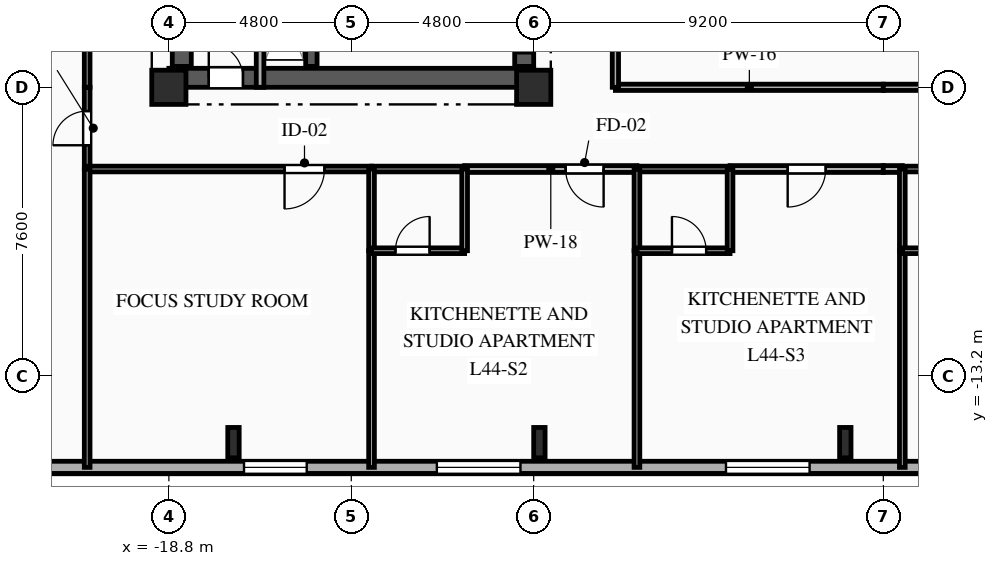
"""IFC4 building model, lengths in metres.
Left out: names, types, materials, properties, quantities, classifications, styles, units other than length and angle.
Written with IfcOpenShell. Run it as: python <this file> out.ifc"""

import sys

from ifc_helpers import new_model, si_unit, direction, frame, frame_2d, origin, origin_2d, place, context, subcontext, project, spatial, rectangle, i_section, extrude, element, fill, save


model = new_model("IFC4")
c1 = context("Model", 3, precision=1e-05, world=origin(), true_north=direction((0.0, 1.0)))
c2 = subcontext(c1, "Body", "Model", "MODEL_VIEW")
j1 = project(units=[si_unit("LENGTHUNIT", "METRE"), si_unit("PLANEANGLEUNIT", "RADIAN")], contexts=[c1])
p1 = place(None, origin())
s1 = spatial("IfcSite", under=j1, at=p1, CompositionType="ELEMENT")
p2 = place(p1, origin())
s2 = spatial("IfcBuilding", under=s1, at=p2, CompositionType="ELEMENT")
p3 = place(p2, frame((0.0, 0.0, 157.8)))
s3 = spatial("IfcBuildingStorey", under=s2, at=p3, CompositionType="ELEMENT", Elevation=157.8)
for number, where, z_axis, x_axis in (
    (1, (-18.8, -5.6, 0.0), (0.0, 0.0, 1.0), (1.0, 0.0, 0.0)),
    (2, (-9.2, -5.6, 0.0), (0.0, 0.0, 1.0), (1.0, 0.0, 0.0)),
):
    element("IfcColumn", number, at=place(p3, frame(where, z_axis=z_axis, x_axis=x_axis)), inside=s3, PredefinedType="COLUMN", context=c2, shape_type="SweptSolid", body=[
        extrude(rectangle(XDim=0.9, YDim=0.9, at=origin_2d()), origin(), (0.0, 0.0, 1.0), 3.35),
    ])
for number, where, z_axis, x_axis in (
    (3, (-17.1, -14.95, 0.0), (0.0, 0.0, 1.0), (1.0, 0.0, 0.0)),
    (4, (-9.05, -14.95, 0.0), (0.0, 0.0, 1.0), (1.0, 0.0, 0.0)),
    (5, (-1.0, -14.95, 0.0), (0.0, 0.0, 1.0), (1.0, 0.0, 0.0)),
):
    element("IfcColumn", number, at=place(p3, frame(where, z_axis=z_axis, x_axis=x_axis)), inside=s3, PredefinedType="COLUMN", context=c2, shape_type="SweptSolid", body=[
        extrude(i_section(OverallWidth=0.3, OverallDepth=0.8, WebThickness=0.018, FlangeThickness=0.033, FilletRadius=0.03, at=origin_2d()), origin(), (0.0, 0.0, 1.0), 3.35),
    ])
p4 = place(p3, frame((23.8, -15.6, 0.0), z_axis=(0.0, 0.0, 1.0), x_axis=(-1.0, 0.0, 0.0)))
e6 = element("IfcWall", 6, at=p4, inside=s3, PredefinedType="SOLIDWALL", context=c2, shape_type="SweptSolid", body=[
    extrude(rectangle(XDim=49.6, YDim=0.32, at=frame_2d((24.8, 0.0))), origin(), (0.0, 0.0, 1.0), 3.04),
])
p5 = place(p4, frame((1.13, 0.0, 0.85)))
e7 = element("IfcOpeningElement", 7, at=p5, cuts=e6, PredefinedType="OPENING", context=c2, shape_type="SweptSolid", body=[
    extrude(rectangle(XDim=1.1, YDim=1.85, at=frame_2d((0.55, 0.925))), frame((0.0, 0.17, 0.0), z_axis=(0.0, -1.0, 0.0), x_axis=(1.0, 0.0, 0.0)), (0.0, 0.0, 1.0), 0.34),
])
p6 = place(p4, frame((5.295, 0.0, 0.85)))
e8 = element("IfcOpeningElement", 8, at=p6, cuts=e6, PredefinedType="OPENING", context=c2, shape_type="SweptSolid", body=[
    extrude(rectangle(XDim=1.65, YDim=1.85, at=frame_2d((0.825, 0.925))), frame((0.0, 0.17, 0.0), z_axis=(0.0, -1.0, 0.0), x_axis=(1.0, 0.0, 0.0)), (0.0, 0.0, 1.0), 0.34),
])
p7 = place(p4, frame((11.74, 0.0, 0.85)))
e9 = element("IfcOpeningElement", 9, at=p7, cuts=e6, PredefinedType="OPENING", context=c2, shape_type="SweptSolid", body=[
    extrude(rectangle(XDim=2.2, YDim=1.85, at=frame_2d((1.1, 0.925))), frame((0.0, 0.17, 0.0), z_axis=(0.0, -1.0, 0.0), x_axis=(1.0, 0.0, 0.0)), (0.0, 0.0, 1.0), 0.34),
])
p8 = place(p4, frame((18.74, 0.0, 0.85)))
e10 = element("IfcOpeningElement", 10, at=p8, cuts=e6, PredefinedType="OPENING", context=c2, shape_type="SweptSolid", body=[
    extrude(rectangle(XDim=2.2, YDim=1.85, at=frame_2d((1.1, 0.925))), frame((0.0, 0.17, 0.0), z_axis=(0.0, -1.0, 0.0), x_axis=(1.0, 0.0, 0.0)), (0.0, 0.0, 1.0), 0.34),
])
p9 = place(p4, frame((25.74, 0.0, 0.85)))
e11 = element("IfcOpeningElement", 11, at=p9, cuts=e6, PredefinedType="OPENING", context=c2, shape_type="SweptSolid", body=[
    extrude(rectangle(XDim=2.2, YDim=1.85, at=frame_2d((1.1, 0.925))), frame((0.0, 0.17, 0.0), z_axis=(0.0, -1.0, 0.0), x_axis=(1.0, 0.0, 0.0)), (0.0, 0.0, 1.0), 0.34),
])
p10 = place(p4, frame((33.348, 0.0, 0.85)))
e12 = element("IfcOpeningElement", 12, at=p10, cuts=e6, PredefinedType="OPENING", context=c2, shape_type="SweptSolid", body=[
    extrude(rectangle(XDim=2.2, YDim=1.85, at=frame_2d((1.1, 0.925))), frame((0.0, 0.17, 0.0), z_axis=(0.0, -1.0, 0.0), x_axis=(1.0, 0.0, 0.0)), (0.0, 0.0, 1.0), 0.34),
])
p11 = place(p4, frame((38.972, 0.0, 0.85)))
e13 = element("IfcOpeningElement", 13, at=p11, cuts=e6, PredefinedType="OPENING", context=c2, shape_type="SweptSolid", body=[
    extrude(rectangle(XDim=1.65, YDim=1.85, at=frame_2d((0.825, 0.925))), frame((0.0, 0.17, 0.0), z_axis=(0.0, -1.0, 0.0), x_axis=(1.0, 0.0, 0.0)), (0.0, 0.0, 1.0), 0.34),
])
p12 = place(p4, frame((45.895, 0.0, 0.85)))
e14 = element("IfcOpeningElement", 14, at=p12, cuts=e6, PredefinedType="OPENING", context=c2, shape_type="SweptSolid", body=[
    extrude(rectangle(XDim=1.65, YDim=1.85, at=frame_2d((0.825, 0.925))), frame((0.0, 0.17, 0.0), z_axis=(0.0, -1.0, 0.0), x_axis=(1.0, 0.0, 0.0)), (0.0, 0.0, 1.0), 0.34),
])
p13 = place(p3, frame((-18.8, -5.35, 0.0), z_axis=(0.0, 0.0, 1.0), x_axis=(1.0, 0.0, 0.0)))
e15 = element("IfcWall", 15, at=p13, inside=s3, PredefinedType="SHEAR", context=c2, shape_type="SweptSolid", body=[
    extrude(rectangle(XDim=9.6, YDim=0.5, at=frame_2d((4.8, 0.0))), origin(), (0.0, 0.0, 1.0), 3.04),
])
p14 = place(p13, frame((1.05, 0.0, 0.0)))
e16 = element("IfcOpeningElement", 16, at=p14, cuts=e15, PredefinedType="OPENING", context=c2, shape_type="SweptSolid", body=[
    extrude(rectangle(XDim=0.9, YDim=2.1, at=frame_2d((0.45, 1.05))), frame((0.0, 0.26, 0.0), z_axis=(0.0, -1.0, 0.0), x_axis=(1.0, 0.0, 0.0)), (0.0, 0.0, 1.0), 0.52),
])
p15 = place(p3, frame((-18.46, -5.05, 0.0), z_axis=(0.0, 0.0, 1.0), x_axis=(0.0, 1.0, 0.0)))
e17 = element("IfcWall", 17, at=p15, inside=s3, PredefinedType="SHEAR", context=c2, shape_type="SweptSolid", body=[
    extrude(rectangle(XDim=10.1, YDim=0.5, at=frame_2d((5.05, 0.0))), origin(), (0.0, 0.0, 1.0), 3.04),
])
p16 = place(p3, frame((-9.45, -5.05, 0.0), z_axis=(0.0, 0.0, 1.0), x_axis=(0.0, 1.0, 0.0)))
e18 = element("IfcWall", 18, at=p16, inside=s3, PredefinedType="SHEAR", context=c2, shape_type="SweptSolid", body=[
    extrude(rectangle(XDim=10.1, YDim=0.5, at=frame_2d((5.05, 0.0))), origin(), (0.0, 0.0, 1.0), 3.04),
])
p17 = place(p16, frame((7.15, 0.0, 0.0)))
e19 = element("IfcOpeningElement", 19, at=p17, cuts=e18, PredefinedType="OPENING", context=c2, shape_type="SweptSolid", body=[
    extrude(rectangle(XDim=0.9, YDim=2.1, at=frame_2d((0.45, 1.05))), frame((0.0, 0.26, 0.0), z_axis=(0.0, -1.0, 0.0), x_axis=(1.0, 0.0, 0.0)), (0.0, 0.0, 1.0), 0.52),
])
p18 = place(p16, frame((2.4, 0.0, 0.0)))
e20 = element("IfcOpeningElement", 20, at=p18, cuts=e18, PredefinedType="OPENING", context=c2, shape_type="SweptSolid", body=[
    extrude(rectangle(XDim=1.2, YDim=2.15, at=frame_2d((0.6, 1.075))), frame((0.0, 0.26, 0.0), z_axis=(0.0, -1.0, 0.0), x_axis=(1.0, 0.0, 0.0)), (0.0, 0.0, 1.0), 0.52),
])
p19 = place(p16, frame((0.35, 0.0, 0.0)))
e21 = element("IfcOpeningElement", 21, at=p19, cuts=e18, PredefinedType="OPENING", context=c2, shape_type="SweptSolid", body=[
    extrude(rectangle(XDim=0.9, YDim=2.1, at=frame_2d((0.45, 1.05))), frame((0.0, 0.26, 0.0), z_axis=(0.0, -1.0, 0.0), x_axis=(1.0, 0.0, 0.0)), (0.0, 0.0, 1.0), 0.52),
])
p20 = place(p16, frame((5.0, 0.0, 0.0)))
e22 = element("IfcOpeningElement", 22, at=p20, cuts=e18, PredefinedType="OPENING", context=c2, shape_type="SweptSolid", body=[
    extrude(rectangle(XDim=0.9, YDim=2.1, at=frame_2d((0.45, 1.05))), frame((0.0, 0.26, 0.0), z_axis=(0.0, -1.0, 0.0), x_axis=(1.0, 0.0, 0.0)), (0.0, 0.0, 1.0), 0.52),
])
p21 = place(p3, frame((-15.05, -5.05, 0.0), z_axis=(0.0, 0.0, 1.0), x_axis=(0.0, 1.0, 0.0)))
e23 = element("IfcWall", 23, at=p21, inside=s3, PredefinedType="SHEAR", context=c2, shape_type="SweptSolid", body=[
    extrude(rectangle(XDim=10.1, YDim=0.3, at=frame_2d((5.05, 0.0))), origin(), (0.0, 0.0, 1.0), 3.04),
])
p22 = place(p3, frame((-16.4, -5.6, 0.0), z_axis=(0.0, 0.0, 1.0), x_axis=(0.0, 1.0, 0.0)))
e24 = element("IfcWall", 24, at=p22, inside=s3, PredefinedType="PARTITIONING", context=c2, shape_type="SweptSolid", body=[
    extrude(rectangle(XDim=3.49, YDim=0.2, at=frame_2d((1.745, 0.0))), origin(), (0.0, 0.0, 1.0), 3.04),
])
p23 = place(p3, frame((-20.95, -7.75, 0.0), z_axis=(0.0, 0.0, 1.0), x_axis=(0.0, 1.0, 0.0)))
e25 = element("IfcWall", 25, at=p23, inside=s3, PredefinedType="PARTITIONING", context=c2, shape_type="SweptSolid", body=[
    extrude(rectangle(XDim=2.15, YDim=0.15, at=frame_2d((1.075, 0.0))), origin(), (0.0, 0.0, 1.0), 3.04),
])
p24 = place(p23, frame((0.625, 0.0, 0.0)))
e26 = element("IfcOpeningElement", 26, at=p24, cuts=e25, PredefinedType="OPENING", context=c2, shape_type="SweptSolid", body=[
    extrude(rectangle(XDim=0.9, YDim=2.1, at=frame_2d((0.45, 1.05))), frame((0.0, 0.085, 0.0), z_axis=(0.0, -1.0, 0.0), x_axis=(1.0, 0.0, 0.0)), (0.0, 0.0, 1.0), 0.17),
])
p25 = place(p3, frame((-13.467, -7.75, 0.0), z_axis=(0.0, 0.0, 1.0), x_axis=(-1.0, 0.0, 0.0)))
e27 = element("IfcWall", 27, at=p25, inside=s3, PredefinedType="PARTITIONING", context=c2, shape_type="SweptSolid", body=[
    extrude(rectangle(XDim=7.483, YDim=0.15, at=frame_2d((3.741, 0.0))), origin(), (0.0, 0.0, 1.0), 3.04),
])
p26 = place(p25, frame((1.239, 0.0, 0.0)))
e28 = element("IfcOpeningElement", 28, at=p26, cuts=e27, PredefinedType="OPENING", context=c2, shape_type="SweptSolid", body=[
    extrude(rectangle(XDim=1.05, YDim=2.15, at=frame_2d((0.525, 1.075))), frame((0.0, 0.085, 0.0), z_axis=(0.0, -1.0, 0.0), x_axis=(1.0, 0.0, 0.0)), (0.0, 0.0, 1.0), 0.17),
])
p27 = place(p3, frame((-6.483, -7.75, 0.0), z_axis=(0.0, 0.0, 1.0), x_axis=(-1.0, 0.0, 0.0)))
e29 = element("IfcWall", 29, at=p27, inside=s3, PredefinedType="PARTITIONING", context=c2, shape_type="SweptSolid", body=[
    extrude(rectangle(XDim=4.534, YDim=0.18, at=frame_2d((2.267, 0.0))), origin(), (0.0, 0.0, 1.0), 3.04),
])
p28 = place(p27, frame((0.877, 0.0, 0.0)))
e30 = element("IfcOpeningElement", 30, at=p28, cuts=e29, PredefinedType="OPENING", context=c2, shape_type="SweptSolid", body=[
    extrude(rectangle(XDim=1.0, YDim=2.15, at=frame_2d((0.5, 1.075))), frame((0.0, 0.1, 0.0), z_axis=(0.0, -1.0, 0.0), x_axis=(1.0, 0.0, 0.0)), (0.0, 0.0, 1.0), 0.2),
])
p29 = place(p3, frame((-11.017, -7.75, 0.0), z_axis=(0.0, 0.0, 1.0), x_axis=(-1.0, 0.0, 0.0)))
e31 = element("IfcWall", 31, at=p29, inside=s3, PredefinedType="PLUMBINGWALL", context=c2, shape_type="SweptSolid", body=[
    extrude(rectangle(XDim=2.45, YDim=0.15, at=frame_2d((1.225, 0.0))), origin(), (0.0, 0.0, 1.0), 3.04),
])
p30 = place(p3, frame((0.0, -7.75, 0.0), z_axis=(0.0, 0.0, 1.0), x_axis=(-1.0, 0.0, 0.0)))
e32 = element("IfcWall", 32, at=p30, inside=s3, PredefinedType="PARTITIONING", context=c2, shape_type="SweptSolid", body=[
    extrude(rectangle(XDim=4.033, YDim=0.18, at=frame_2d((2.017, 0.0))), origin(), (0.0, 0.0, 1.0), 3.04),
])
p31 = place(p30, frame((1.517, 0.0, 0.0)))
e33 = element("IfcOpeningElement", 33, at=p31, cuts=e32, PredefinedType="OPENING", context=c2, shape_type="SweptSolid", body=[
    extrude(rectangle(XDim=1.0, YDim=2.15, at=frame_2d((0.5, 1.075))), frame((0.0, 0.1, 0.0), z_axis=(0.0, -1.0, 0.0), x_axis=(1.0, 0.0, 0.0)), (0.0, 0.0, 1.0), 0.2),
])
p32 = place(p3, frame((-4.033, -7.75, 0.0), z_axis=(0.0, 0.0, 1.0), x_axis=(-1.0, 0.0, 0.0)))
e34 = element("IfcWall", 34, at=p32, inside=s3, PredefinedType="PLUMBINGWALL", context=c2, shape_type="SweptSolid", body=[
    extrude(rectangle(XDim=2.45, YDim=0.15, at=frame_2d((1.225, 0.0))), origin(), (0.0, 0.0, 1.0), 3.04),
])
p33 = place(p3, frame((-7.05, -5.6, 0.0), z_axis=(0.0, 0.0, 1.0), x_axis=(1.0, 0.0, 0.0)))
e35 = element("IfcWall", 35, at=p33, inside=s3, PredefinedType="PARTITIONING", context=c2, shape_type="SweptSolid", body=[
    extrude(rectangle(XDim=7.05, YDim=0.165, at=frame_2d((3.525, 0.0))), origin(), (0.0, 0.0, 1.0), 2.525),
])
p34 = place(p3, frame((0.5, -7.75, 0.0), z_axis=(0.0, 0.0, 1.0), x_axis=(-1.0, 0.0, 0.0)))
e36 = element("IfcWall", 36, at=p34, inside=s3, PredefinedType="PARTITIONING", context=c2, shape_type="SweptSolid", body=[
    extrude(rectangle(XDim=0.5, YDim=0.18, at=frame_2d((0.25, 0.0))), origin(), (0.0, 0.0, 1.0), 3.04),
])
p35 = place(p3, frame((2.95, -7.75, 0.0), z_axis=(0.0, 0.0, 1.0), x_axis=(-1.0, 0.0, 0.0)))
e37 = element("IfcWall", 37, at=p35, inside=s3, PredefinedType="PLUMBINGWALL", context=c2, shape_type="SweptSolid", body=[
    extrude(rectangle(XDim=2.45, YDim=0.15, at=frame_2d((1.225, 0.0))), origin(), (0.0, 0.0, 1.0), 3.04),
])
p36 = place(p3, frame((0.0, -5.6, 0.0), z_axis=(0.0, 0.0, 1.0), x_axis=(1.0, 0.0, 0.0)))
e38 = element("IfcWall", 38, at=p36, inside=s3, PredefinedType="PARTITIONING", context=c2, shape_type="SweptSolid", body=[
    extrude(rectangle(XDim=7.05, YDim=0.165, at=frame_2d((3.525, 0.0))), origin(), (0.0, 0.0, 1.0), 2.525),
])
p37 = place(p3, frame((-20.95, -5.6, 0.0), z_axis=(0.0, 0.0, 1.0), x_axis=(0.0, 1.0, 0.0)))
e39 = element("IfcWall", 39, at=p37, inside=s3, PredefinedType="PARTITIONING", context=c2, shape_type="SweptSolid", body=[
    extrude(rectangle(XDim=2.14, YDim=0.15, at=frame_2d((1.07, 0.0))), origin(), (0.0, 0.0, 1.0), 3.04),
])
p38 = place(p3, frame((-7.05, -2.95, 0.0), z_axis=(0.0, 0.0, 1.0), x_axis=(0.0, -1.0, 0.0)))
e40 = element("IfcWall", 40, at=p38, inside=s3, PredefinedType="PARTITIONING", context=c2, shape_type="SweptSolid", body=[
    extrude(rectangle(XDim=2.65, YDim=0.165, at=frame_2d((1.325, 0.0))), origin(), (0.0, 0.0, 1.0), 3.04),
])
p39 = place(p3, frame((-20.95, -7.75, 0.0), z_axis=(0.0, 0.0, 1.0), x_axis=(0.0, -1.0, 0.0)))
e41 = element("IfcWall", 41, at=p39, inside=s3, PredefinedType="PARTITIONING", context=c2, shape_type="SweptSolid", body=[
    extrude(rectangle(XDim=7.85, YDim=0.15, at=frame_2d((3.925, 0.0))), origin(), (0.0, 0.0, 1.0), 3.04),
])
p40 = place(p3, frame((-13.467, -9.9, 0.0), z_axis=(0.0, 0.0, 1.0), x_axis=(0.0, -1.0, 0.0)))
e42 = element("IfcWall", 42, at=p40, inside=s3, PredefinedType="PARTITIONING", context=c2, shape_type="SweptSolid", body=[
    extrude(rectangle(XDim=5.7, YDim=0.15, at=frame_2d((2.85, 0.0))), origin(), (0.0, 0.0, 1.0), 3.04),
])
p41 = place(p3, frame((-13.467, -7.75, 0.0), z_axis=(0.0, 0.0, 1.0), x_axis=(0.0, -1.0, 0.0)))
e43 = element("IfcWall", 43, at=p41, inside=s3, PredefinedType="PLUMBINGWALL", context=c2, shape_type="SweptSolid", body=[
    extrude(rectangle(XDim=2.15, YDim=0.15, at=frame_2d((1.075, 0.0))), origin(), (0.0, 0.0, 1.0), 3.04),
])
p42 = place(p3, frame((-13.467, -9.9, 0.0), z_axis=(0.0, 0.0, 1.0), x_axis=(1.0, 0.0, 0.0)))
e44 = element("IfcWall", 44, at=p42, inside=s3, PredefinedType="PLUMBINGWALL", context=c2, shape_type="SweptSolid", body=[
    extrude(rectangle(XDim=2.45, YDim=0.15, at=frame_2d((1.225, 0.0))), origin(), (0.0, 0.0, 1.0), 3.04),
])
p43 = place(p42, frame((0.629, 0.0, 0.0)))
e45 = element("IfcOpeningElement", 45, at=p43, cuts=e44, PredefinedType="OPENING", context=c2, shape_type="SweptSolid", body=[
    extrude(rectangle(XDim=0.9, YDim=2.1, at=frame_2d((0.45, 1.05))), frame((0.0, 0.085, 0.0), z_axis=(0.0, -1.0, 0.0), x_axis=(1.0, 0.0, 0.0)), (0.0, 0.0, 1.0), 0.17),
])
p44 = place(p3, frame((-11.017, -9.9, 0.0), z_axis=(0.0, 0.0, 1.0), x_axis=(0.0, 1.0, 0.0)))
e46 = element("IfcWall", 46, at=p44, inside=s3, PredefinedType="PLUMBINGWALL", context=c2, shape_type="SweptSolid", body=[
    extrude(rectangle(XDim=2.15, YDim=0.15, at=frame_2d((1.075, 0.0))), origin(), (0.0, 0.0, 1.0), 3.04),
])
p45 = place(p3, frame((-6.483, -9.9, 0.0), z_axis=(0.0, 0.0, 1.0), x_axis=(0.0, -1.0, 0.0)))
e47 = element("IfcWall", 47, at=p45, inside=s3, PredefinedType="PARTITIONING", context=c2, shape_type="SweptSolid", body=[
    extrude(rectangle(XDim=5.7, YDim=0.15, at=frame_2d((2.85, 0.0))), origin(), (0.0, 0.0, 1.0), 3.04),
])
p46 = place(p3, frame((-6.483, -7.75, 0.0), z_axis=(0.0, 0.0, 1.0), x_axis=(0.0, -1.0, 0.0)))
e48 = element("IfcWall", 48, at=p46, inside=s3, PredefinedType="PLUMBINGWALL", context=c2, shape_type="SweptSolid", body=[
    extrude(rectangle(XDim=2.15, YDim=0.15, at=frame_2d((1.075, 0.0))), origin(), (0.0, 0.0, 1.0), 3.04),
])
p47 = place(p3, frame((-6.483, -9.9, 0.0), z_axis=(0.0, 0.0, 1.0), x_axis=(1.0, 0.0, 0.0)))
e49 = element("IfcWall", 49, at=p47, inside=s3, PredefinedType="PLUMBINGWALL", context=c2, shape_type="SweptSolid", body=[
    extrude(rectangle(XDim=2.45, YDim=0.15, at=frame_2d((1.225, 0.0))), origin(), (0.0, 0.0, 1.0), 3.04),
])
p48 = place(p47, frame((0.921, 0.0, 0.0)))
e50 = element("IfcOpeningElement", 50, at=p48, cuts=e49, PredefinedType="OPENING", context=c2, shape_type="SweptSolid", body=[
    extrude(rectangle(XDim=0.9, YDim=2.1, at=frame_2d((0.45, 1.05))), frame((0.0, 0.085, 0.0), z_axis=(0.0, -1.0, 0.0), x_axis=(1.0, 0.0, 0.0)), (0.0, 0.0, 1.0), 0.17),
])
p49 = place(p3, frame((-4.033, -9.9, 0.0), z_axis=(0.0, 0.0, 1.0), x_axis=(0.0, 1.0, 0.0)))
e51 = element("IfcWall", 51, at=p49, inside=s3, PredefinedType="PLUMBINGWALL", context=c2, shape_type="SweptSolid", body=[
    extrude(rectangle(XDim=2.15, YDim=0.15, at=frame_2d((1.075, 0.0))), origin(), (0.0, 0.0, 1.0), 3.04),
])
p50 = place(p3, frame((0.5, -9.9, 0.0), z_axis=(0.0, 0.0, 1.0), x_axis=(0.0, -1.0, 0.0)))
e52 = element("IfcWall", 52, at=p50, inside=s3, PredefinedType="PARTITIONING", context=c2, shape_type="SweptSolid", body=[
    extrude(rectangle(XDim=5.7, YDim=0.15, at=frame_2d((2.85, 0.0))), origin(), (0.0, 0.0, 1.0), 3.04),
])
p51 = place(p3, frame((0.5, -7.75, 0.0), z_axis=(0.0, 0.0, 1.0), x_axis=(0.0, -1.0, 0.0)))
e53 = element("IfcWall", 53, at=p51, inside=s3, PredefinedType="PLUMBINGWALL", context=c2, shape_type="SweptSolid", body=[
    extrude(rectangle(XDim=2.15, YDim=0.15, at=frame_2d((1.075, 0.0))), origin(), (0.0, 0.0, 1.0), 3.04),
])
p52 = place(p3, frame((0.5, -9.9, 0.0), z_axis=(0.0, 0.0, 1.0), x_axis=(1.0, 0.0, 0.0)))
e54 = element("IfcWall", 54, at=p52, inside=s3, PredefinedType="PLUMBINGWALL", context=c2, shape_type="SweptSolid", body=[
    extrude(rectangle(XDim=2.45, YDim=0.15, at=frame_2d((1.225, 0.0))), origin(), (0.0, 0.0, 1.0), 3.04),
])
p53 = place(p52, frame((0.921, 0.0, 0.0)))
e55 = element("IfcOpeningElement", 55, at=p53, cuts=e54, PredefinedType="OPENING", context=c2, shape_type="SweptSolid", body=[
    extrude(rectangle(XDim=0.9, YDim=2.1, at=frame_2d((0.45, 1.05))), frame((0.0, 0.085, 0.0), z_axis=(0.0, -1.0, 0.0), x_axis=(1.0, 0.0, 0.0)), (0.0, 0.0, 1.0), 0.17),
])
p54 = place(p9, origin())
e56 = element("IfcWindow", 56, at=p54, inside=s3, PartitioningType="SINGLE_PANEL", PredefinedType="WINDOW", context=c2, shape_type="SweptSolid", body=[
    extrude(rectangle(XDim=2.2, YDim=1.85, at=frame_2d((1.1, 0.925))), frame((0.0, 0.03, 0.0), z_axis=(0.0, -1.0, 0.0), x_axis=(1.0, 0.0, 0.0)), (0.0, 0.0, 1.0), 0.06),
])
fill(e11, e56)
p55 = place(p10, origin())
e57 = element("IfcWindow", 57, at=p55, inside=s3, PartitioningType="SINGLE_PANEL", PredefinedType="WINDOW", context=c2, shape_type="SweptSolid", body=[
    extrude(rectangle(XDim=2.2, YDim=1.85, at=frame_2d((1.1, 0.925))), frame((0.0, 0.03, 0.0), z_axis=(0.0, -1.0, 0.0), x_axis=(1.0, 0.0, 0.0)), (0.0, 0.0, 1.0), 0.06),
])
fill(e12, e57)
p56 = place(p11, origin())
e58 = element("IfcWindow", 58, at=p56, inside=s3, PartitioningType="SINGLE_PANEL", PredefinedType="WINDOW", context=c2, shape_type="SweptSolid", body=[
    extrude(rectangle(XDim=1.65, YDim=1.85, at=frame_2d((0.825, 0.925))), frame((0.0, 0.03, 0.0), z_axis=(0.0, -1.0, 0.0), x_axis=(1.0, 0.0, 0.0)), (0.0, 0.0, 1.0), 0.06),
])
fill(e13, e58)
p57 = place(p14, origin())
e59 = element("IfcDoor", 59, at=p57, inside=s3, OperationType="SINGLE_SWING_LEFT", PredefinedType="DOOR", context=c2, shape_type="SweptSolid", body=[
    extrude(rectangle(XDim=0.9, YDim=2.1, at=frame_2d((0.45, 1.05))), frame((0.0, 0.025, 0.0), z_axis=(0.0, -1.0, 0.0), x_axis=(1.0, 0.0, 0.0)), (0.0, 0.0, 1.0), 0.05),
])
fill(e16, e59)
p58 = place(p19, origin())
e60 = element("IfcDoor", 60, at=p58, inside=s3, OperationType="SINGLE_SWING_RIGHT", PredefinedType="DOOR", context=c2, shape_type="SweptSolid", body=[
    extrude(rectangle(XDim=0.9, YDim=2.1, at=frame_2d((0.45, 1.05))), frame((0.0, 0.025, 0.0), z_axis=(0.0, -1.0, 0.0), x_axis=(1.0, 0.0, 0.0)), (0.0, 0.0, 1.0), 0.05),
])
fill(e21, e60)
p59 = place(p24, origin())
e61 = element("IfcDoor", 61, at=p59, inside=s3, OperationType="SINGLE_SWING_LEFT", PredefinedType="DOOR", context=c2, shape_type="SweptSolid", body=[
    extrude(rectangle(XDim=0.9, YDim=2.1, at=frame_2d((0.45, 1.05))), frame((0.0, 0.025, 0.0), z_axis=(0.0, -1.0, 0.0), x_axis=(1.0, 0.0, 0.0)), (0.0, 0.0, 1.0), 0.05),
])
fill(e26, e61)
p60 = place(p26, origin())
e62 = element("IfcDoor", 62, at=p60, inside=s3, OperationType="SINGLE_SWING_RIGHT", PredefinedType="DOOR", context=c2, shape_type="SweptSolid", body=[
    extrude(rectangle(XDim=1.05, YDim=2.15, at=frame_2d((0.525, 1.075))), frame((0.0, 0.025, 0.0), z_axis=(0.0, -1.0, 0.0), x_axis=(1.0, 0.0, 0.0)), (0.0, 0.0, 1.0), 0.05),
])
fill(e28, e62)
p61 = place(p28, origin())
e63 = element("IfcDoor", 63, at=p61, inside=s3, OperationType="SINGLE_SWING_LEFT", PredefinedType="DOOR", context=c2, shape_type="SweptSolid", body=[
    extrude(rectangle(XDim=1.0, YDim=2.15, at=frame_2d((0.5, 1.075))), frame((0.0, 0.025, 0.0), z_axis=(0.0, -1.0, 0.0), x_axis=(1.0, 0.0, 0.0)), (0.0, 0.0, 1.0), 0.05),
])
fill(e30, e63)
p62 = place(p31, origin())
e64 = element("IfcDoor", 64, at=p62, inside=s3, OperationType="SINGLE_SWING_RIGHT", PredefinedType="DOOR", context=c2, shape_type="SweptSolid", body=[
    extrude(rectangle(XDim=1.0, YDim=2.15, at=frame_2d((0.5, 1.075))), frame((0.0, 0.025, 0.0), z_axis=(0.0, -1.0, 0.0), x_axis=(1.0, 0.0, 0.0)), (0.0, 0.0, 1.0), 0.05),
])
fill(e33, e64)
p63 = place(p43, origin())
e65 = element("IfcDoor", 65, at=p63, inside=s3, OperationType="SINGLE_SWING_RIGHT", PredefinedType="DOOR", context=c2, shape_type="SweptSolid", body=[
    extrude(rectangle(XDim=0.9, YDim=2.1, at=frame_2d((0.45, 1.05))), frame((0.0, 0.025, 0.0), z_axis=(0.0, -1.0, 0.0), x_axis=(1.0, 0.0, 0.0)), (0.0, 0.0, 1.0), 0.05),
])
fill(e45, e65)
p64 = place(p48, origin())
e66 = element("IfcDoor", 66, at=p64, inside=s3, OperationType="SINGLE_SWING_LEFT", PredefinedType="DOOR", context=c2, shape_type="SweptSolid", body=[
    extrude(rectangle(XDim=0.9, YDim=2.1, at=frame_2d((0.45, 1.05))), frame((0.0, 0.025, 0.0), z_axis=(0.0, -1.0, 0.0), x_axis=(1.0, 0.0, 0.0)), (0.0, 0.0, 1.0), 0.05),
])
fill(e50, e66)
save(model, sys.argv[1])
